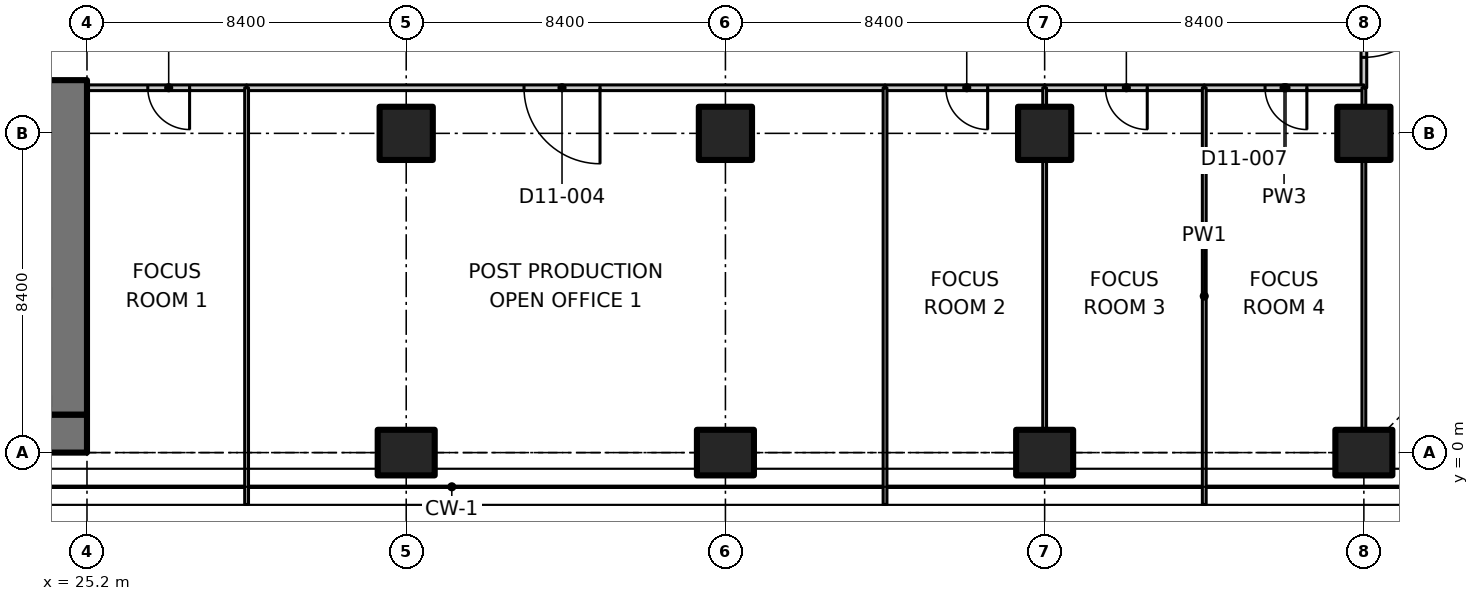
"""IFC4 building model, lengths in metres.
Left out: names, types, materials, properties, quantities, classifications, styles, units other than length and angle.
Written with IfcOpenShell. Run it as: python <this file> out.ifc"""

import sys

from ifc_helpers import new_model, si_unit, direction, frame, frame_2d, origin, origin_2d, place, context, subcontext, project, spatial, polyline, rectangle, outline, extrude, element, fill, save


model = new_model("IFC4")
c1 = context("Model", 3, precision=1e-05, world=origin(), true_north=direction((0.0, 1.0)))
c2 = subcontext(c1, "Body", "Model", "MODEL_VIEW")
j1 = project(units=[si_unit("LENGTHUNIT", "METRE"), si_unit("PLANEANGLEUNIT", "RADIAN")], contexts=[c1])
p1 = place(None, origin())
s1 = spatial("IfcSite", under=j1, at=p1, CompositionType="ELEMENT")
p2 = place(p1, origin())
s2 = spatial("IfcBuilding", under=s1, at=p2, CompositionType="ELEMENT")
p3 = place(p2, frame((0.0, 0.0, 79.7)))
s3 = spatial("IfcBuildingStorey", under=s2, at=p3, CompositionType="ELEMENT", Elevation=79.7)
p4 = place(p3, frame((33.6, 0.0, 0.0), z_axis=(0.0, 0.0, 1.0), x_axis=(0.0, 1.0, 0.0)))
e1 = element("IfcColumn", 1, at=p4, inside=s3, PredefinedType="COLUMN", context=c2, shape_type="SweptSolid", body=[
    extrude(rectangle(XDim=1.2, YDim=1.5, at=origin_2d()), origin(), (0.0, 0.0, 1.0), 3.35),
])
p5 = place(p3, frame((33.6, 8.4, 0.0), z_axis=(0.0, 0.0, 1.0), x_axis=(1.0, 0.0, 0.0)))
e2 = element("IfcColumn", 2, at=p5, inside=s3, PredefinedType="COLUMN", context=c2, shape_type="SweptSolid", body=[
    extrude(rectangle(XDim=1.4, YDim=1.4, at=origin_2d()), origin(), (0.0, 0.0, 1.0), 3.35),
])
p6 = place(p3, frame((42.0, 0.0, 0.0), z_axis=(0.0, 0.0, 1.0), x_axis=(0.0, 1.0, 0.0)))
e3 = element("IfcColumn", 3, at=p6, inside=s3, PredefinedType="COLUMN", context=c2, shape_type="SweptSolid", body=[
    extrude(rectangle(XDim=1.2, YDim=1.5, at=origin_2d()), origin(), (0.0, 0.0, 1.0), 3.35),
])
p7 = place(p3, frame((42.0, 8.4, 0.0), z_axis=(0.0, 0.0, 1.0), x_axis=(1.0, 0.0, 0.0)))
e4 = element("IfcColumn", 4, at=p7, inside=s3, PredefinedType="COLUMN", context=c2, shape_type="SweptSolid", body=[
    extrude(rectangle(XDim=1.4, YDim=1.4, at=origin_2d()), origin(), (0.0, 0.0, 1.0), 3.35),
])
p8 = place(p3, frame((50.4, 0.0, 0.0), z_axis=(0.0, 0.0, 1.0), x_axis=(0.0, 1.0, 0.0)))
e5 = element("IfcColumn", 5, at=p8, inside=s3, PredefinedType="COLUMN", context=c2, shape_type="SweptSolid", body=[
    extrude(rectangle(XDim=1.2, YDim=1.5, at=origin_2d()), origin(), (0.0, 0.0, 1.0), 3.35),
])
p9 = place(p3, frame((50.4, 8.4, 0.0), z_axis=(0.0, 0.0, 1.0), x_axis=(1.0, 0.0, 0.0)))
e6 = element("IfcColumn", 6, at=p9, inside=s3, PredefinedType="COLUMN", context=c2, shape_type="SweptSolid", body=[
    extrude(rectangle(XDim=1.4, YDim=1.4, at=origin_2d()), origin(), (0.0, 0.0, 1.0), 3.35),
])
p10 = place(p3, frame((58.8, 0.0, 0.0), z_axis=(0.0, 0.0, 1.0), x_axis=(0.0, 1.0, 0.0)))
e7 = element("IfcColumn", 7, at=p10, inside=s3, PredefinedType="COLUMN", context=c2, shape_type="SweptSolid", body=[
    extrude(rectangle(XDim=1.2, YDim=1.5, at=origin_2d()), origin(), (0.0, 0.0, 1.0), 3.35),
])
p11 = place(p3, frame((58.8, 8.4, 0.0), z_axis=(0.0, 0.0, 1.0), x_axis=(1.0, 0.0, 0.0)))
e8 = element("IfcColumn", 8, at=p11, inside=s3, PredefinedType="COLUMN", context=c2, shape_type="SweptSolid", body=[
    extrude(rectangle(XDim=1.4, YDim=1.4, at=origin_2d()), origin(), (0.0, 0.0, 1.0), 3.35),
])
p12 = place(p3, frame((6.936, 0.5, 0.0), z_axis=(0.0, 0.0, 1.0), x_axis=(1.0, 0.0, 0.0)))
e9 = element("IfcWall", 9, at=p12, inside=s3, PredefinedType="SHEAR", context=c2, shape_type="SweptSolid", body=[
    extrude(rectangle(XDim=18.264, YDim=1.0, at=frame_2d((9.132, 0.0))), origin(), (0.0, 0.0, 1.0), 3.35),
])
p13 = place(p3, frame((24.7, 1.0, 0.0), z_axis=(0.0, 0.0, 1.0), x_axis=(0.0, 1.0, 0.0)))
e10 = element("IfcWall", 10, at=p13, inside=s3, PredefinedType="SHEAR", context=c2, shape_type="SweptSolid", body=[
    extrude(rectangle(XDim=8.8, YDim=1.0, at=frame_2d((4.4, 0.0))), origin(), (0.0, 0.0, 1.0), 3.35),
])
p14 = place(p3, frame((29.4, 9.6, 0.0), z_axis=(0.0, 0.0, 1.0), x_axis=(-1.0, 0.0, 0.0)))
e11 = element("IfcWall", 11, at=p14, inside=s3, PredefinedType="PARTITIONING", context=c2, shape_type="SweptSolid", body=[
    extrude(rectangle(XDim=4.2, YDim=0.15, at=frame_2d((2.1, 0.0))), origin(), (0.0, 0.0, 1.0), 3.33),
])
p15 = place(p14, frame((1.5, 0.0, 0.0)))
e12 = element("IfcOpeningElement", 12, at=p15, cuts=e11, PredefinedType="OPENING", context=c2, shape_type="SweptSolid", body=[
    extrude(rectangle(XDim=1.1, YDim=2.1, at=frame_2d((0.55, 1.05))), frame((0.0, 0.085, 0.0), z_axis=(0.0, -1.0, 0.0), x_axis=(1.0, 0.0, 0.0)), (0.0, 0.0, 1.0), 0.17),
])
p16 = place(p3, frame((58.8, 13.0, 0.0), z_axis=(0.0, 0.0, 1.0), x_axis=(0.0, -1.0, 0.0)))
e13 = element("IfcWall", 13, at=p16, inside=s3, PredefinedType="PARTITIONING", context=c2, shape_type="SweptSolid", body=[
    extrude(rectangle(XDim=3.4, YDim=0.15, at=frame_2d((1.7, 0.0))), origin(), (0.0, 0.0, 1.0), 3.33),
])
p17 = place(p16, frame((0.6, 0.0, 0.0)))
e14 = element("IfcOpeningElement", 14, at=p17, cuts=e13, PredefinedType="OPENING", context=c2, shape_type="SweptSolid", body=[
    extrude(rectangle(XDim=2.0, YDim=2.4, at=frame_2d((1.0, 1.2))), frame((0.0, 0.085, 0.0), z_axis=(0.0, -1.0, 0.0), x_axis=(1.0, 0.0, 0.0)), (0.0, 0.0, 1.0), 0.17),
])
p18 = place(p3, frame((46.2, 9.6, 0.0), z_axis=(0.0, 0.0, 1.0), x_axis=(-1.0, 0.0, 0.0)))
e15 = element("IfcWall", 15, at=p18, inside=s3, PredefinedType="PARTITIONING", context=c2, shape_type="SweptSolid", body=[
    extrude(rectangle(XDim=16.8, YDim=0.15, at=frame_2d((8.4, 0.0))), origin(), (0.0, 0.0, 1.0), 3.33),
])
p19 = place(p18, frame((7.5, 0.0, 0.0)))
e16 = element("IfcOpeningElement", 16, at=p19, cuts=e15, PredefinedType="OPENING", context=c2, shape_type="SweptSolid", body=[
    extrude(rectangle(XDim=2.0, YDim=2.4, at=frame_2d((1.0, 1.2))), frame((0.0, 0.085, 0.0), z_axis=(0.0, -1.0, 0.0), x_axis=(1.0, 0.0, 0.0)), (0.0, 0.0, 1.0), 0.17),
])
p20 = place(p3, frame((50.4, 9.6, 0.0), z_axis=(0.0, 0.0, 1.0), x_axis=(-1.0, 0.0, 0.0)))
e17 = element("IfcWall", 17, at=p20, inside=s3, PredefinedType="PARTITIONING", context=c2, shape_type="SweptSolid", body=[
    extrude(rectangle(XDim=4.2, YDim=0.15, at=frame_2d((2.1, 0.0))), origin(), (0.0, 0.0, 1.0), 3.33),
])
p21 = place(p20, frame((1.5, 0.0, 0.0)))
e18 = element("IfcOpeningElement", 18, at=p21, cuts=e17, PredefinedType="OPENING", context=c2, shape_type="SweptSolid", body=[
    extrude(rectangle(XDim=1.1, YDim=2.1, at=frame_2d((0.55, 1.05))), frame((0.0, 0.085, 0.0), z_axis=(0.0, -1.0, 0.0), x_axis=(1.0, 0.0, 0.0)), (0.0, 0.0, 1.0), 0.17),
])
p22 = place(p3, frame((54.6, 9.6, 0.0), z_axis=(0.0, 0.0, 1.0), x_axis=(-1.0, 0.0, 0.0)))
e19 = element("IfcWall", 19, at=p22, inside=s3, PredefinedType="PARTITIONING", context=c2, shape_type="SweptSolid", body=[
    extrude(rectangle(XDim=4.2, YDim=0.15, at=frame_2d((2.1, 0.0))), origin(), (0.0, 0.0, 1.0), 3.33),
])
p23 = place(p22, frame((1.5, 0.0, 0.0)))
e20 = element("IfcOpeningElement", 20, at=p23, cuts=e19, PredefinedType="OPENING", context=c2, shape_type="SweptSolid", body=[
    extrude(rectangle(XDim=1.1, YDim=2.1, at=frame_2d((0.55, 1.05))), frame((0.0, 0.085, 0.0), z_axis=(0.0, -1.0, 0.0), x_axis=(1.0, 0.0, 0.0)), (0.0, 0.0, 1.0), 0.17),
])
p24 = place(p3, frame((58.8, 9.6, 0.0), z_axis=(0.0, 0.0, 1.0), x_axis=(-1.0, 0.0, 0.0)))
e21 = element("IfcWall", 21, at=p24, inside=s3, PredefinedType="PARTITIONING", context=c2, shape_type="SweptSolid", body=[
    extrude(rectangle(XDim=4.2, YDim=0.15, at=frame_2d((2.1, 0.0))), origin(), (0.0, 0.0, 1.0), 3.33),
])
p25 = place(p24, frame((1.5, 0.0, 0.0)))
e22 = element("IfcOpeningElement", 22, at=p25, cuts=e21, PredefinedType="OPENING", context=c2, shape_type="SweptSolid", body=[
    extrude(rectangle(XDim=1.1, YDim=2.1, at=frame_2d((0.55, 1.05))), frame((0.0, 0.085, 0.0), z_axis=(0.0, -1.0, 0.0), x_axis=(1.0, 0.0, 0.0)), (0.0, 0.0, 1.0), 0.17),
])
p26 = place(p3, frame((58.8, 0.62, 0.0), z_axis=(0.0, 0.0, 1.0), x_axis=(0.0, 1.0, 0.0)))
e23 = element("IfcWall", 23, at=p26, inside=s3, PredefinedType="PARTITIONING", context=c2, shape_type="SweptSolid", body=[
    extrude(rectangle(XDim=7.06, YDim=0.1, at=frame_2d((3.53, 0.0))), origin(), (0.0, 0.0, 1.0), 3.33),
])
p27 = place(p3, frame((58.8, 9.12, 0.0), z_axis=(0.0, 0.0, 1.0), x_axis=(0.0, 1.0, 0.0)))
e24 = element("IfcWall", 24, at=p27, inside=s3, PredefinedType="PARTITIONING", context=c2, shape_type="SweptSolid", body=[
    extrude(rectangle(XDim=0.48, YDim=0.1, at=frame_2d((0.24, 0.0))), origin(), (0.0, 0.0, 1.0), 3.33),
])
for number, where, z_axis, x_axis in (
    (25, (29.4, 9.6, 0.0), (0.0, 0.0, 1.0), (0.0, -1.0, 0.0)),
    (26, (46.2, 9.6, 0.0), (0.0, 0.0, 1.0), (0.0, -1.0, 0.0)),
):
    element("IfcWall", number, at=place(p3, frame(where, z_axis=z_axis, x_axis=x_axis)), inside=s3, PredefinedType="PARTITIONING", context=c2, shape_type="SweptSolid", body=[
        extrude(outline(polyline([(0.0, 0.0), (10.965, 0.0), (10.965, 3.33), (10.7, 3.33), (10.05, 3.33), (10.048, 2.98), (9.152, 2.98), (9.15, 3.33), (0.0, 3.33), (0.0, 0.0)])), frame((0.0, 0.05, 0.0), z_axis=(0.0, -1.0, 0.0), x_axis=(1.0, 0.0, 0.0)), (0.0, 0.0, 1.0), 0.1),
    ])
p28 = place(p3, frame((50.4, 9.6, 0.0), z_axis=(0.0, 0.0, 1.0), x_axis=(0.0, -1.0, 0.0)))
e27 = element("IfcWall", 27, at=p28, inside=s3, PredefinedType="PARTITIONING", context=c2, shape_type="SweptSolid", body=[
    extrude(rectangle(XDim=0.48, YDim=0.1, at=frame_2d((0.24, 0.0))), origin(), (0.0, 0.0, 1.0), 3.33),
])
p29 = place(p3, frame((50.4, 7.68, 0.0), z_axis=(0.0, 0.0, 1.0), x_axis=(0.0, -1.0, 0.0)))
e28 = element("IfcWall", 28, at=p29, inside=s3, PredefinedType="PARTITIONING", context=c2, shape_type="SweptSolid", body=[
    extrude(rectangle(XDim=7.06, YDim=0.1, at=frame_2d((3.53, 0.0))), origin(), (0.0, 0.0, 1.0), 3.33),
])
p30 = place(p3, frame((54.6, 9.6, 0.0), z_axis=(0.0, 0.0, 1.0), x_axis=(0.0, -1.0, 0.0)))
e29 = element("IfcWall", 29, at=p30, inside=s3, PredefinedType="PARTITIONING", context=c2, shape_type="SweptSolid", body=[
    extrude(outline(polyline([(0.0, 0.0), (10.965, 0.0), (10.965, 3.33), (10.7, 3.33), (10.05, 3.33), (10.048, 2.98), (9.152, 2.98), (9.15, 3.33), (0.0, 3.33), (0.0, 0.0)])), frame((0.0, 0.05, 0.0), z_axis=(0.0, -1.0, 0.0), x_axis=(1.0, 0.0, 0.0)), (0.0, 0.0, 1.0), 0.1),
])
p31 = place(p17, origin())
e30 = element("IfcDoor", 30, at=p31, inside=s3, OperationType="DOUBLE_DOOR_SINGLE_SWING", PredefinedType="DOOR", context=c2, shape_type="SweptSolid", body=[
    extrude(rectangle(XDim=2.0, YDim=2.4, at=frame_2d((1.0, 1.2))), frame((0.0, 0.025, 0.0), z_axis=(0.0, -1.0, 0.0), x_axis=(1.0, 0.0, 0.0)), (0.0, 0.0, 1.0), 0.05),
])
fill(e14, e30)
p32 = place(p15, origin())
e31 = element("IfcDoor", 31, at=p32, inside=s3, OperationType="SINGLE_SWING_LEFT", PredefinedType="DOOR", context=c2, shape_type="SweptSolid", body=[
    extrude(rectangle(XDim=1.1, YDim=2.1, at=frame_2d((0.55, 1.05))), frame((0.0, 0.025, 0.0), z_axis=(0.0, -1.0, 0.0), x_axis=(1.0, 0.0, 0.0)), (0.0, 0.0, 1.0), 0.05),
])
fill(e12, e31)
p33 = place(p19, origin())
e32 = element("IfcDoor", 32, at=p33, inside=s3, OperationType="DOUBLE_DOOR_SINGLE_SWING", PredefinedType="DOOR", context=c2, shape_type="SweptSolid", body=[
    extrude(rectangle(XDim=2.0, YDim=2.4, at=frame_2d((1.0, 1.2))), frame((0.0, 0.025, 0.0), z_axis=(0.0, -1.0, 0.0), x_axis=(1.0, 0.0, 0.0)), (0.0, 0.0, 1.0), 0.05),
])
fill(e16, e32)
p34 = place(p21, origin())
e33 = element("IfcDoor", 33, at=p34, inside=s3, OperationType="SINGLE_SWING_LEFT", PredefinedType="DOOR", context=c2, shape_type="SweptSolid", body=[
    extrude(rectangle(XDim=1.1, YDim=2.1, at=frame_2d((0.55, 1.05))), frame((0.0, 0.025, 0.0), z_axis=(0.0, -1.0, 0.0), x_axis=(1.0, 0.0, 0.0)), (0.0, 0.0, 1.0), 0.05),
])
fill(e18, e33)
p35 = place(p23, origin())
e34 = element("IfcDoor", 34, at=p35, inside=s3, OperationType="SINGLE_SWING_LEFT", PredefinedType="DOOR", context=c2, shape_type="SweptSolid", body=[
    extrude(rectangle(XDim=1.1, YDim=2.1, at=frame_2d((0.55, 1.05))), frame((0.0, 0.025, 0.0), z_axis=(0.0, -1.0, 0.0), x_axis=(1.0, 0.0, 0.0)), (0.0, 0.0, 1.0), 0.05),
])
fill(e20, e34)
p36 = place(p25, origin())
e35 = element("IfcDoor", 35, at=p36, inside=s3, OperationType="SINGLE_SWING_LEFT", PredefinedType="DOOR", context=c2, shape_type="SweptSolid", body=[
    extrude(rectangle(XDim=1.1, YDim=2.1, at=frame_2d((0.55, 1.05))), frame((0.0, 0.025, 0.0), z_axis=(0.0, -1.0, 0.0), x_axis=(1.0, 0.0, 0.0)), (0.0, 0.0, 1.0), 0.05),
])
fill(e22, e35)
save(model, sys.argv[1])
